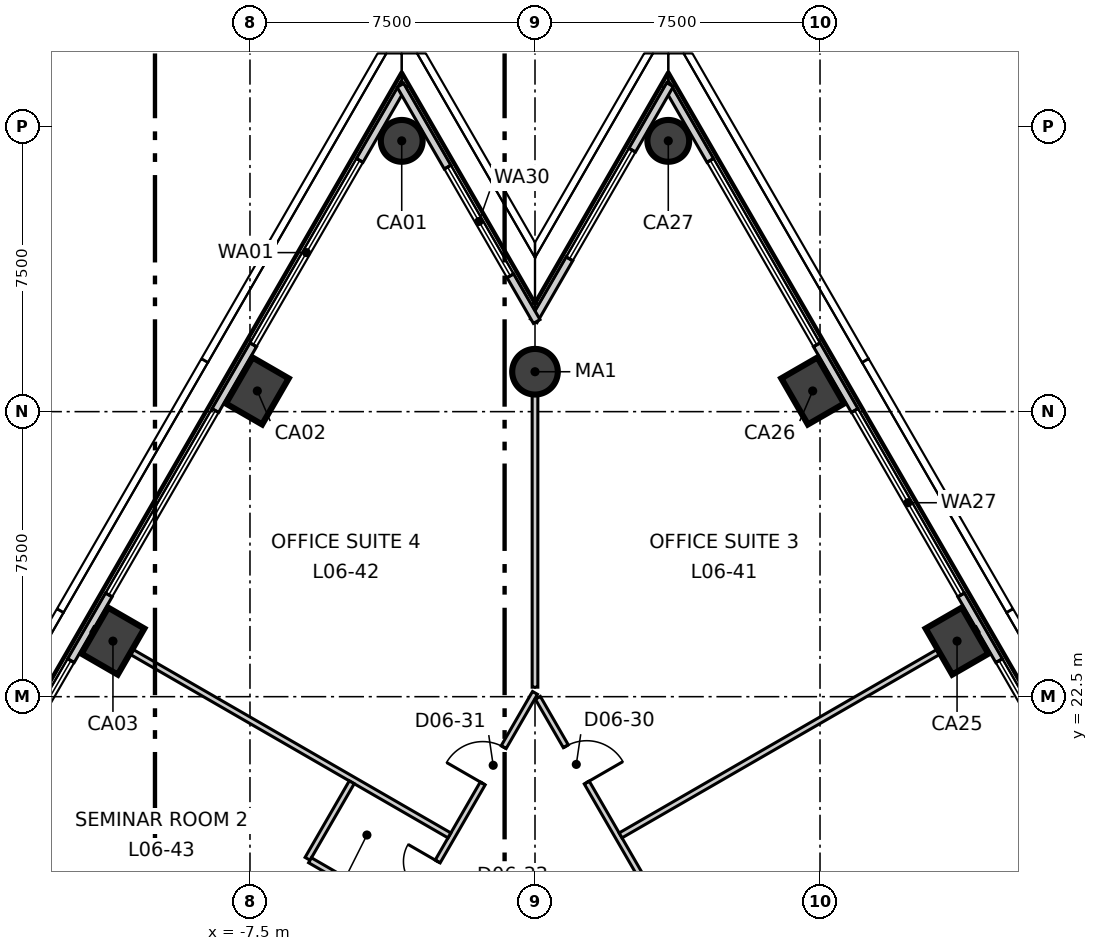
"""IFC4 building model, lengths in metres.
Left out: names, types, materials, properties, quantities, classifications, styles, units other than length and angle.
Written with IfcOpenShell. Run it as: python <this file> out.ifc"""

import sys

from ifc_helpers import new_model, si_unit, direction, frame, frame_2d, origin, origin_2d, place, context, subcontext, project, spatial, rectangle, circle, extrude, element, fill, save


model = new_model("IFC4")
c1 = context("Model", 3, precision=1e-05, world=origin(), true_north=direction((0.0, 1.0)))
c2 = subcontext(c1, "Body", "Model", "MODEL_VIEW")
j1 = project(units=[si_unit("LENGTHUNIT", "METRE"), si_unit("PLANEANGLEUNIT", "RADIAN")], contexts=[c1])
p1 = place(None, origin())
s1 = spatial("IfcSite", under=j1, at=p1, CompositionType="ELEMENT")
p2 = place(p1, origin())
s2 = spatial("IfcBuilding", under=s1, at=p2, CompositionType="ELEMENT")
p3 = place(p2, frame((0.0, 0.0, 35.3)))
s3 = spatial("IfcBuildingStorey", under=s2, at=p3, CompositionType="ELEMENT", Elevation=35.3)
p4 = place(p3, frame((-3.507, 37.125, -0.3), z_axis=(0.0, 0.0, 1.0), x_axis=(0.5, 0.866025403784, 0.0)))
e1 = element("IfcColumn", 1, at=p4, inside=s3, PredefinedType="COLUMN", context=c2, shape_type="SweptSolid", body=[
    extrude(circle(Radius=0.55, at=origin_2d()), origin(), (0.0, 0.0, 1.0), 4.0),
])
for number, where, z_axis, x_axis in (
    (2, (-7.307, 30.544, -0.3), (0.0, 0.0, 1.0), (0.5, 0.866, 0.0)),
    (3, (-11.106, 23.962, -0.3), (0.0, 0.0, 1.0), (0.5, 0.866, 0.0)),
    (4, (11.106, 23.962, -0.3), (0.0, 0.0, 1.0), (-0.5, 0.866, 0.0)),
    (5, (7.307, 30.544, -0.3), (0.0, 0.0, 1.0), (-0.5, 0.866, 0.0)),
):
    element("IfcColumn", number, at=place(p3, frame(where, z_axis=z_axis, x_axis=x_axis)), inside=s3, PredefinedType="COLUMN", context=c2, shape_type="SweptSolid", body=[
        extrude(rectangle(XDim=1.4, YDim=1.1, at=origin_2d()), origin(), (0.0, 0.0, 1.0), 4.0),
    ])
p5 = place(p3, frame((3.507, 37.125, -0.3), z_axis=(0.0, 0.0, 1.0), x_axis=(-0.5, 0.866025403784, 0.0)))
e6 = element("IfcColumn", 6, at=p5, inside=s3, PredefinedType="COLUMN", context=c2, shape_type="SweptSolid", body=[
    extrude(circle(Radius=0.55, at=origin_2d()), origin(), (0.0, 0.0, 1.0), 4.0),
])
p6 = place(p3, frame((0.0, 31.05, -0.3), z_axis=(0.0, 0.0, 1.0), x_axis=(1.0, 0.0, 0.0)))
e7 = element("IfcColumn", 7, at=p6, inside=s3, PredefinedType="COLUMN", context=c2, shape_type="SweptSolid", body=[
    extrude(circle(Radius=0.6, at=origin_2d()), origin(), (0.0, 0.0, 1.0), 4.0),
])
p7 = place(p3, frame((-3.462, 38.603, 0.0), z_axis=(0.0, 0.0, 1.0), x_axis=(-0.500012207976, -0.866018355391, 0.0)))
e8 = element("IfcWall", 8, at=p7, inside=s3, PredefinedType="ELEMENTEDWALL", context=c2, shape_type="SweptSolid", body=[
    extrude(rectangle(XDim=63.381, YDim=0.2, at=frame_2d((31.69, 0.0))), origin(), (0.0, 0.0, 1.0), 3.7),
])
p8 = place(p7, frame((2.302, 0.0, 0.9)))
e9 = element("IfcOpeningElement", 9, at=p8, cuts=e8, PredefinedType="OPENING", context=c2, shape_type="SweptSolid", body=[
    extrude(rectangle(XDim=5.6, YDim=2.5, at=frame_2d((2.8, 1.25))), frame((0.0, 0.11, 0.0), z_axis=(0.0, -1.0, 0.0), x_axis=(1.0, 0.0, 0.0)), (0.0, 0.0, 1.0), 0.22),
])
p9 = place(p7, frame((9.902, 0.0, 0.9)))
e10 = element("IfcOpeningElement", 10, at=p9, cuts=e8, PredefinedType="OPENING", context=c2, shape_type="SweptSolid", body=[
    extrude(rectangle(XDim=5.6, YDim=2.5, at=frame_2d((2.8, 1.25))), frame((0.0, 0.11, 0.0), z_axis=(0.0, -1.0, 0.0), x_axis=(1.0, 0.0, 0.0)), (0.0, 0.0, 1.0), 0.22),
])
p10 = place(p7, frame((17.501, 0.0, 0.9)))
e11 = element("IfcOpeningElement", 11, at=p10, cuts=e8, PredefinedType="OPENING", context=c2, shape_type="SweptSolid", body=[
    extrude(rectangle(XDim=5.6, YDim=2.5, at=frame_2d((2.8, 1.25))), frame((0.0, 0.11, 0.0), z_axis=(0.0, -1.0, 0.0), x_axis=(1.0, 0.0, 0.0)), (0.0, 0.0, 1.0), 0.22),
])
p11 = place(p7, frame((25.1, 0.0, 0.9)))
e12 = element("IfcOpeningElement", 12, at=p11, cuts=e8, PredefinedType="OPENING", context=c2, shape_type="SweptSolid", body=[
    extrude(rectangle(XDim=5.6, YDim=2.5, at=frame_2d((2.8, 1.25))), frame((0.0, 0.11, 0.0), z_axis=(0.0, -1.0, 0.0), x_axis=(1.0, 0.0, 0.0)), (0.0, 0.0, 1.0), 0.22),
])
p12 = place(p7, frame((32.7, 0.0, 0.9)))
e13 = element("IfcOpeningElement", 13, at=p12, cuts=e8, PredefinedType="OPENING", context=c2, shape_type="SweptSolid", body=[
    extrude(rectangle(XDim=5.6, YDim=2.5, at=frame_2d((2.8, 1.25))), frame((0.0, 0.11, 0.0), z_axis=(0.0, -1.0, 0.0), x_axis=(1.0, 0.0, 0.0)), (0.0, 0.0, 1.0), 0.22),
])
p13 = place(p7, frame((40.299, 0.0, 0.9)))
e14 = element("IfcOpeningElement", 14, at=p13, cuts=e8, PredefinedType="OPENING", context=c2, shape_type="SweptSolid", body=[
    extrude(rectangle(XDim=5.6, YDim=2.5, at=frame_2d((2.8, 1.25))), frame((0.0, 0.11, 0.0), z_axis=(0.0, -1.0, 0.0), x_axis=(1.0, 0.0, 0.0)), (0.0, 0.0, 1.0), 0.22),
])
p14 = place(p7, frame((47.899, 0.0, 0.9)))
e15 = element("IfcOpeningElement", 15, at=p14, cuts=e8, PredefinedType="OPENING", context=c2, shape_type="SweptSolid", body=[
    extrude(rectangle(XDim=5.6, YDim=2.5, at=frame_2d((2.8, 1.25))), frame((0.0, 0.11, 0.0), z_axis=(0.0, -1.0, 0.0), x_axis=(1.0, 0.0, 0.0)), (0.0, 0.0, 1.0), 0.22),
])
p15 = place(p7, frame((55.498, 0.0, 0.9)))
e16 = element("IfcOpeningElement", 16, at=p15, cuts=e8, PredefinedType="OPENING", context=c2, shape_type="SweptSolid", body=[
    extrude(rectangle(XDim=5.6, YDim=2.5, at=frame_2d((2.8, 1.25))), frame((0.0, 0.11, 0.0), z_axis=(0.0, -1.0, 0.0), x_axis=(1.0, 0.0, 0.0)), (0.0, 0.0, 1.0), 0.22),
])
p16 = place(p3, frame((35.163, -16.303, 0.0), z_axis=(0.0, 0.0, 1.0), x_axis=(-0.500012207976, 0.866018355391, 0.0)))
e17 = element("IfcWall", 17, at=p16, inside=s3, PredefinedType="ELEMENTEDWALL", context=c2, shape_type="SweptSolid", body=[
    extrude(rectangle(XDim=63.381, YDim=0.2, at=frame_2d((31.69, 0.0))), origin(), (0.0, 0.0, 1.0), 3.7),
])
p17 = place(p16, frame((2.302, 0.0, 0.9)))
e18 = element("IfcOpeningElement", 18, at=p17, cuts=e17, PredefinedType="OPENING", context=c2, shape_type="SweptSolid", body=[
    extrude(rectangle(XDim=5.6, YDim=2.5, at=frame_2d((2.8, 1.25))), frame((0.0, 0.11, 0.0), z_axis=(0.0, -1.0, 0.0), x_axis=(1.0, 0.0, 0.0)), (0.0, 0.0, 1.0), 0.22),
])
p18 = place(p16, frame((9.902, 0.0, 0.9)))
e19 = element("IfcOpeningElement", 19, at=p18, cuts=e17, PredefinedType="OPENING", context=c2, shape_type="SweptSolid", body=[
    extrude(rectangle(XDim=5.6, YDim=2.5, at=frame_2d((2.8, 1.25))), frame((0.0, 0.11, 0.0), z_axis=(0.0, -1.0, 0.0), x_axis=(1.0, 0.0, 0.0)), (0.0, 0.0, 1.0), 0.22),
])
p19 = place(p16, frame((17.501, 0.0, 0.9)))
e20 = element("IfcOpeningElement", 20, at=p19, cuts=e17, PredefinedType="OPENING", context=c2, shape_type="SweptSolid", body=[
    extrude(rectangle(XDim=5.6, YDim=2.5, at=frame_2d((2.8, 1.25))), frame((0.0, 0.11, 0.0), z_axis=(0.0, -1.0, 0.0), x_axis=(1.0, 0.0, 0.0)), (0.0, 0.0, 1.0), 0.22),
])
p20 = place(p16, frame((25.101, 0.0, 0.9)))
e21 = element("IfcOpeningElement", 21, at=p20, cuts=e17, PredefinedType="OPENING", context=c2, shape_type="SweptSolid", body=[
    extrude(rectangle(XDim=5.6, YDim=2.5, at=frame_2d((2.8, 1.25))), frame((0.0, 0.11, 0.0), z_axis=(0.0, -1.0, 0.0), x_axis=(1.0, 0.0, 0.0)), (0.0, 0.0, 1.0), 0.22),
])
p21 = place(p16, frame((32.7, 0.0, 0.9)))
e22 = element("IfcOpeningElement", 22, at=p21, cuts=e17, PredefinedType="OPENING", context=c2, shape_type="SweptSolid", body=[
    extrude(rectangle(XDim=5.6, YDim=2.5, at=frame_2d((2.8, 1.25))), frame((0.0, 0.11, 0.0), z_axis=(0.0, -1.0, 0.0), x_axis=(1.0, 0.0, 0.0)), (0.0, 0.0, 1.0), 0.22),
])
p22 = place(p16, frame((40.299, 0.0, 0.9)))
e23 = element("IfcOpeningElement", 23, at=p22, cuts=e17, PredefinedType="OPENING", context=c2, shape_type="SweptSolid", body=[
    extrude(rectangle(XDim=5.6, YDim=2.5, at=frame_2d((2.8, 1.25))), frame((0.0, 0.11, 0.0), z_axis=(0.0, -1.0, 0.0), x_axis=(1.0, 0.0, 0.0)), (0.0, 0.0, 1.0), 0.22),
])
p23 = place(p16, frame((47.899, 0.0, 0.9)))
e24 = element("IfcOpeningElement", 24, at=p23, cuts=e17, PredefinedType="OPENING", context=c2, shape_type="SweptSolid", body=[
    extrude(rectangle(XDim=5.6, YDim=2.5, at=frame_2d((2.8, 1.25))), frame((0.0, 0.11, 0.0), z_axis=(0.0, -1.0, 0.0), x_axis=(1.0, 0.0, 0.0)), (0.0, 0.0, 1.0), 0.22),
])
p24 = place(p16, frame((55.498, 0.0, 0.9)))
e25 = element("IfcOpeningElement", 25, at=p24, cuts=e17, PredefinedType="OPENING", context=c2, shape_type="SweptSolid", body=[
    extrude(rectangle(XDim=5.6, YDim=2.5, at=frame_2d((2.8, 1.25))), frame((0.0, 0.11, 0.0), z_axis=(0.0, -1.0, 0.0), x_axis=(1.0, 0.0, 0.0)), (0.0, 0.0, 1.0), 0.22),
])
p25 = place(p3, frame((3.552, 38.603, 0.0), z_axis=(0.0, 0.0, 1.0), x_axis=(-0.499915874128, -0.866073968431, 0.0)))
e26 = element("IfcWall", 26, at=p25, inside=s3, PredefinedType="ELEMENTEDWALL", context=c2, shape_type="SweptSolid", body=[
    extrude(rectangle(XDim=7.175, YDim=0.2, at=frame_2d((3.587, 0.0))), origin(), (0.0, 0.0, 1.0), 3.7),
])
p26 = place(p25, frame((1.99, 0.0, 0.9)))
e27 = element("IfcOpeningElement", 27, at=p26, cuts=e26, PredefinedType="OPENING", context=c2, shape_type="SweptSolid", body=[
    extrude(rectangle(XDim=3.3, YDim=2.5, at=frame_2d((1.65, 1.25))), frame((0.0, 0.11, 0.0), z_axis=(0.0, -1.0, 0.0), x_axis=(1.0, 0.0, 0.0)), (0.0, 0.0, 1.0), 0.22),
])
p27 = place(p3, frame((0.045, 32.372, 0.0), z_axis=(0.0, 0.0, 1.0), x_axis=(-0.499930606701, 0.866065464318, 0.0)))
e28 = element("IfcWall", 28, at=p27, inside=s3, PredefinedType="ELEMENTEDWALL", context=c2, shape_type="SweptSolid", body=[
    extrude(rectangle(XDim=7.175, YDim=0.2, at=frame_2d((3.587, 0.0))), origin(), (0.0, 0.0, 1.0), 3.7),
])
p28 = place(p27, frame((1.39, 0.0, 0.9)))
e29 = element("IfcOpeningElement", 29, at=p28, cuts=e28, PredefinedType="OPENING", context=c2, shape_type="SweptSolid", body=[
    extrude(rectangle(XDim=3.3, YDim=2.5, at=frame_2d((1.65, 1.25))), frame((0.0, 0.11, 0.0), z_axis=(0.0, -1.0, 0.0), x_axis=(1.0, 0.0, 0.0)), (0.0, 0.0, 1.0), 0.22),
])
p29 = place(p3, frame((-19.497, -11.17, 0.0), z_axis=(0.0, 0.0, 1.0), x_axis=(0.499998854553, 0.866026065108, 0.0)))
e30 = element("IfcWall", 30, at=p29, inside=s3, PredefinedType="PARTITIONING", context=c2, shape_type="SweptSolid", body=[
    extrude(rectangle(XDim=38.994, YDim=0.15, at=frame_2d((19.497, 0.0))), origin(), (0.0, 0.0, 1.0), 3.7),
])
p30 = place(p29, frame((36.244, 0.0, 0.0)))
e31 = element("IfcOpeningElement", 31, at=p30, cuts=e30, PredefinedType="OPENING", context=c2, shape_type="SweptSolid", body=[
    extrude(rectangle(XDim=1.1, YDim=2.1, at=frame_2d((0.55, 1.05))), frame((0.0, 0.085, 0.0), z_axis=(0.0, -1.0, 0.0), x_axis=(1.0, 0.0, 0.0)), (0.0, 0.0, 1.0), 0.17),
])
p31 = place(p29, frame((29.171, 0.0, 0.0)))
e32 = element("IfcOpeningElement", 32, at=p31, cuts=e30, PredefinedType="OPENING", context=c2, shape_type="SweptSolid", body=[
    extrude(rectangle(XDim=1.0, YDim=2.1, at=frame_2d((0.5, 1.05))), frame((0.0, 0.085, 0.0), z_axis=(0.0, -1.0, 0.0), x_axis=(1.0, 0.0, 0.0)), (0.0, 0.0, 1.0), 0.17),
])
p32 = place(p29, frame((32.971, 0.0, 0.0)))
e33 = element("IfcOpeningElement", 33, at=p32, cuts=e30, PredefinedType="OPENING", context=c2, shape_type="SweptSolid", body=[
    extrude(rectangle(XDim=0.9, YDim=2.1, at=frame_2d((0.45, 1.05))), frame((0.0, 0.085, 0.0), z_axis=(0.0, -1.0, 0.0), x_axis=(1.0, 0.0, 0.0)), (0.0, 0.0, 1.0), 0.17),
])
p33 = place(p29, frame((22.771, 0.0, 0.0)))
e34 = element("IfcOpeningElement", 34, at=p33, cuts=e30, PredefinedType="OPENING", context=c2, shape_type="SweptSolid", body=[
    extrude(rectangle(XDim=1.0, YDim=2.1, at=frame_2d((0.5, 1.05))), frame((0.0, 0.085, 0.0), z_axis=(0.0, -1.0, 0.0), x_axis=(1.0, 0.0, 0.0)), (0.0, 0.0, 1.0), 0.17),
])
p34 = place(p29, frame((6.872, 0.0, 0.0)))
e35 = element("IfcOpeningElement", 35, at=p34, cuts=e30, PredefinedType="OPENING", context=c2, shape_type="SweptSolid", body=[
    extrude(rectangle(XDim=1.1, YDim=2.1, at=frame_2d((0.55, 1.05))), frame((0.0, 0.085, 0.0), z_axis=(0.0, -1.0, 0.0), x_axis=(1.0, 0.0, 0.0)), (0.0, 0.0, 1.0), 0.17),
])
p35 = place(p29, frame((17.372, 0.0, 0.0)))
e36 = element("IfcOpeningElement", 36, at=p35, cuts=e30, PredefinedType="OPENING", context=c2, shape_type="SweptSolid", body=[
    extrude(rectangle(XDim=0.9, YDim=2.1, at=frame_2d((0.45, 1.05))), frame((0.0, 0.085, 0.0), z_axis=(0.0, -1.0, 0.0), x_axis=(1.0, 0.0, 0.0)), (0.0, 0.0, 1.0), 0.17),
])
p36 = place(p29, frame((14.172, 0.0, 0.0)))
e37 = element("IfcOpeningElement", 37, at=p36, cuts=e30, PredefinedType="OPENING", context=c2, shape_type="SweptSolid", body=[
    extrude(rectangle(XDim=0.9, YDim=2.1, at=frame_2d((0.45, 1.05))), frame((0.0, 0.085, 0.0), z_axis=(0.0, -1.0, 0.0), x_axis=(1.0, 0.0, 0.0)), (0.0, 0.0, 1.0), 0.17),
])
p37 = place(p29, frame((11.272, 0.0, 0.0)))
e38 = element("IfcOpeningElement", 38, at=p37, cuts=e30, PredefinedType="OPENING", context=c2, shape_type="SweptSolid", body=[
    extrude(rectangle(XDim=1.0, YDim=2.1, at=frame_2d((0.5, 1.05))), frame((0.0, 0.085, 0.0), z_axis=(0.0, -1.0, 0.0), x_axis=(1.0, 0.0, 0.0)), (0.0, 0.0, 1.0), 0.17),
])
p38 = place(p29, frame((1.473, 0.0, 0.0)))
e39 = element("IfcOpeningElement", 39, at=p38, cuts=e30, PredefinedType="OPENING", context=c2, shape_type="SweptSolid", body=[
    extrude(rectangle(XDim=1.1, YDim=2.1, at=frame_2d((0.55, 1.05))), frame((0.0, 0.085, 0.0), z_axis=(0.0, -1.0, 0.0), x_axis=(1.0, 0.0, 0.0)), (0.0, 0.0, 1.0), 0.17),
])
p39 = place(p3, frame((-11.643, 24.272, 0.0), z_axis=(0.0, 0.0, 1.0), x_axis=(0.866028869058, -0.499993997921, 0.0)))
e40 = element("IfcWall", 40, at=p39, inside=s3, PredefinedType="PARTITIONING", context=c2, shape_type="SweptSolid", body=[
    extrude(rectangle(XDim=10.844, YDim=0.15, at=frame_2d((5.422, 0.0))), origin(), (0.0, 0.0, 1.0), 3.7),
])
p40 = place(p3, frame((-5.985, 18.234, 0.0), z_axis=(0.0, 0.0, 1.0), x_axis=(0.500067724834, 0.865986299303, 0.0)))
e41 = element("IfcWall", 41, at=p40, inside=s3, PredefinedType="PARTITIONING", context=c2, shape_type="SweptSolid", body=[
    extrude(rectangle(XDim=2.326, YDim=0.15, at=frame_2d((1.163, 0.0))), origin(), (0.0, 0.0, 1.0), 3.7),
])
p41 = place(p3, frame((-5.92, 18.196, 0.0), z_axis=(0.0, 0.0, 1.0), x_axis=(0.866004402611, -0.500036373335, 0.0)))
e42 = element("IfcWall", 42, at=p41, inside=s3, PredefinedType="PARTITIONING", context=c2, shape_type="SweptSolid", body=[
    extrude(rectangle(XDim=2.85, YDim=0.15, at=frame_2d((1.425, 0.0))), origin(), (0.0, 0.0, 1.0), 3.7),
])
p42 = place(p3, frame((0.0, 22.75, 0.0), z_axis=(0.0, 0.0, 1.0), x_axis=(0.0, 1.0, 0.0)))
e43 = element("IfcWall", 43, at=p42, inside=s3, PredefinedType="PARTITIONING", context=c2, shape_type="SweptSolid", body=[
    extrude(rectangle(XDim=8.92, YDim=0.15, at=frame_2d((4.46, 0.0))), origin(), (0.0, 0.0, 1.0), 3.05),
])
p43 = place(p3, frame((0.075, 22.47, 0.0), z_axis=(0.0, 0.0, 1.0), x_axis=(0.500002280369, -0.866024087209, 0.0)))
e44 = element("IfcWall", 44, at=p43, inside=s3, PredefinedType="PARTITIONING", context=c2, shape_type="SweptSolid", body=[
    extrude(rectangle(XDim=38.844, YDim=0.15, at=frame_2d((19.422, 0.0))), origin(), (0.0, 0.0, 1.0), 3.7),
])
p44 = place(p43, frame((36.244, 0.0, 0.0)))
e45 = element("IfcOpeningElement", 45, at=p44, cuts=e44, PredefinedType="OPENING", context=c2, shape_type="SweptSolid", body=[
    extrude(rectangle(XDim=1.1, YDim=2.1, at=frame_2d((0.55, 1.05))), frame((0.0, 0.085, 0.0), z_axis=(0.0, -1.0, 0.0), x_axis=(1.0, 0.0, 0.0)), (0.0, 0.0, 1.0), 0.17),
])
p45 = place(p43, frame((26.472, 0.0, 0.0)))
e46 = element("IfcOpeningElement", 46, at=p45, cuts=e44, PredefinedType="OPENING", context=c2, shape_type="SweptSolid", body=[
    extrude(rectangle(XDim=1.1, YDim=2.1, at=frame_2d((0.55, 1.05))), frame((0.0, 0.085, 0.0), z_axis=(0.0, -1.0, 0.0), x_axis=(1.0, 0.0, 0.0)), (0.0, 0.0, 1.0), 0.17),
])
p46 = place(p43, frame((8.872, 0.0, 0.0)))
e47 = element("IfcOpeningElement", 47, at=p46, cuts=e44, PredefinedType="OPENING", context=c2, shape_type="SweptSolid", body=[
    extrude(rectangle(XDim=1.1, YDim=2.1, at=frame_2d((0.55, 1.05))), frame((0.0, 0.085, 0.0), z_axis=(0.0, -1.0, 0.0), x_axis=(1.0, 0.0, 0.0)), (0.0, 0.0, 1.0), 0.17),
])
p47 = place(p43, frame((17.672, 0.0, 0.0)))
e48 = element("IfcOpeningElement", 48, at=p47, cuts=e44, PredefinedType="OPENING", context=c2, shape_type="SweptSolid", body=[
    extrude(rectangle(XDim=0.9, YDim=2.1, at=frame_2d((0.45, 1.05))), frame((0.0, 0.085, 0.0), z_axis=(0.0, -1.0, 0.0), x_axis=(1.0, 0.0, 0.0)), (0.0, 0.0, 1.0), 0.17),
])
p48 = place(p43, frame((15.272, 0.0, 0.0)))
e49 = element("IfcOpeningElement", 49, at=p48, cuts=e44, PredefinedType="OPENING", context=c2, shape_type="SweptSolid", body=[
    extrude(rectangle(XDim=0.9, YDim=2.1, at=frame_2d((0.45, 1.05))), frame((0.0, 0.085, 0.0), z_axis=(0.0, -1.0, 0.0), x_axis=(1.0, 0.0, 0.0)), (0.0, 0.0, 1.0), 0.17),
])
p49 = place(p43, frame((1.473, 0.0, 0.0)))
e50 = element("IfcOpeningElement", 50, at=p49, cuts=e44, PredefinedType="OPENING", context=c2, shape_type="SweptSolid", body=[
    extrude(rectangle(XDim=1.1, YDim=2.1, at=frame_2d((0.55, 1.05))), frame((0.0, 0.085, 0.0), z_axis=(0.0, -1.0, 0.0), x_axis=(1.0, 0.0, 0.0)), (0.0, 0.0, 1.0), 0.17),
])
p50 = place(p3, frame((2.252, 18.85, 0.0), z_axis=(0.0, 0.0, 1.0), x_axis=(0.866028869058, 0.499993997921, 0.0)))
e51 = element("IfcWall", 51, at=p50, inside=s3, PredefinedType="PARTITIONING", context=c2, shape_type="SweptSolid", body=[
    extrude(rectangle(XDim=10.844, YDim=0.15, at=frame_2d((5.422, 0.0))), origin(), (0.0, 0.0, 1.0), 3.7),
])
p51 = place(p8, origin())
e52 = element("IfcWindow", 52, at=p51, inside=s3, PartitioningType="SINGLE_PANEL", PredefinedType="WINDOW", context=c2, shape_type="SweptSolid", body=[
    extrude(rectangle(XDim=5.6, YDim=2.5, at=frame_2d((2.8, 1.25))), frame((0.0, 0.03, 0.0), z_axis=(0.0, -1.0, 0.0), x_axis=(1.0, 0.0, 0.0)), (0.0, 0.0, 1.0), 0.06),
])
fill(e9, e52)
p52 = place(p9, origin())
e53 = element("IfcWindow", 53, at=p52, inside=s3, PartitioningType="SINGLE_PANEL", PredefinedType="WINDOW", context=c2, shape_type="SweptSolid", body=[
    extrude(rectangle(XDim=5.6, YDim=2.5, at=frame_2d((2.8, 1.25))), frame((0.0, 0.03, 0.0), z_axis=(0.0, -1.0, 0.0), x_axis=(1.0, 0.0, 0.0)), (0.0, 0.0, 1.0), 0.06),
])
fill(e10, e53)
p53 = place(p10, origin())
e54 = element("IfcWindow", 54, at=p53, inside=s3, PartitioningType="SINGLE_PANEL", PredefinedType="WINDOW", context=c2, shape_type="SweptSolid", body=[
    extrude(rectangle(XDim=5.6, YDim=2.5, at=frame_2d((2.8, 1.25))), frame((0.0, 0.03, 0.0), z_axis=(0.0, -1.0, 0.0), x_axis=(1.0, 0.0, 0.0)), (0.0, 0.0, 1.0), 0.06),
])
fill(e11, e54)
p54 = place(p22, origin())
e55 = element("IfcWindow", 55, at=p54, inside=s3, PartitioningType="SINGLE_PANEL", PredefinedType="WINDOW", context=c2, shape_type="SweptSolid", body=[
    extrude(rectangle(XDim=5.6, YDim=2.5, at=frame_2d((2.8, 1.25))), frame((0.0, 0.03, 0.0), z_axis=(0.0, -1.0, 0.0), x_axis=(1.0, 0.0, 0.0)), (0.0, 0.0, 1.0), 0.06),
])
fill(e23, e55)
p55 = place(p23, origin())
e56 = element("IfcWindow", 56, at=p55, inside=s3, PartitioningType="SINGLE_PANEL", PredefinedType="WINDOW", context=c2, shape_type="SweptSolid", body=[
    extrude(rectangle(XDim=5.6, YDim=2.5, at=frame_2d((2.8, 1.25))), frame((0.0, 0.03, 0.0), z_axis=(0.0, -1.0, 0.0), x_axis=(1.0, 0.0, 0.0)), (0.0, 0.0, 1.0), 0.06),
])
fill(e24, e56)
p56 = place(p24, origin())
e57 = element("IfcWindow", 57, at=p56, inside=s3, PartitioningType="SINGLE_PANEL", PredefinedType="WINDOW", context=c2, shape_type="SweptSolid", body=[
    extrude(rectangle(XDim=5.6, YDim=2.5, at=frame_2d((2.8, 1.25))), frame((0.0, 0.03, 0.0), z_axis=(0.0, -1.0, 0.0), x_axis=(1.0, 0.0, 0.0)), (0.0, 0.0, 1.0), 0.06),
])
fill(e25, e57)
p57 = place(p26, origin())
e58 = element("IfcWindow", 58, at=p57, inside=s3, PartitioningType="SINGLE_PANEL", PredefinedType="WINDOW", context=c2, shape_type="SweptSolid", body=[
    extrude(rectangle(XDim=3.3, YDim=2.5, at=frame_2d((1.65, 1.25))), frame((0.0, 0.03, 0.0), z_axis=(0.0, -1.0, 0.0), x_axis=(1.0, 0.0, 0.0)), (0.0, 0.0, 1.0), 0.06),
])
fill(e27, e58)
p58 = place(p28, origin())
e59 = element("IfcWindow", 59, at=p58, inside=s3, PartitioningType="SINGLE_PANEL", PredefinedType="WINDOW", context=c2, shape_type="SweptSolid", body=[
    extrude(rectangle(XDim=3.3, YDim=2.5, at=frame_2d((1.65, 1.25))), frame((0.0, 0.03, 0.0), z_axis=(0.0, -1.0, 0.0), x_axis=(1.0, 0.0, 0.0)), (0.0, 0.0, 1.0), 0.06),
])
fill(e29, e59)
p59 = place(p49, origin())
e60 = element("IfcDoor", 60, at=p59, inside=s3, OperationType="SINGLE_SWING_LEFT", PredefinedType="DOOR", context=c2, shape_type="SweptSolid", body=[
    extrude(rectangle(XDim=1.1, YDim=2.1, at=frame_2d((0.55, 1.05))), frame((0.0, 0.025, 0.0), z_axis=(0.0, -1.0, 0.0), x_axis=(1.0, 0.0, 0.0)), (0.0, 0.0, 1.0), 0.05),
])
fill(e50, e60)
p60 = place(p30, origin())
e61 = element("IfcDoor", 61, at=p60, inside=s3, OperationType="SINGLE_SWING_RIGHT", PredefinedType="DOOR", context=c2, shape_type="SweptSolid", body=[
    extrude(rectangle(XDim=1.1, YDim=2.1, at=frame_2d((0.55, 1.05))), frame((0.0, 0.025, 0.0), z_axis=(0.0, -1.0, 0.0), x_axis=(1.0, 0.0, 0.0)), (0.0, 0.0, 1.0), 0.05),
])
fill(e31, e61)
p61 = place(p32, origin())
e62 = element("IfcDoor", 62, at=p61, inside=s3, OperationType="SINGLE_SWING_LEFT", PredefinedType="DOOR", context=c2, shape_type="SweptSolid", body=[
    extrude(rectangle(XDim=0.9, YDim=2.1, at=frame_2d((0.45, 1.05))), frame((0.0, 0.025, 0.0), z_axis=(0.0, -1.0, 0.0), x_axis=(1.0, 0.0, 0.0)), (0.0, 0.0, 1.0), 0.05),
])
fill(e33, e62)
save(model, sys.argv[1])
